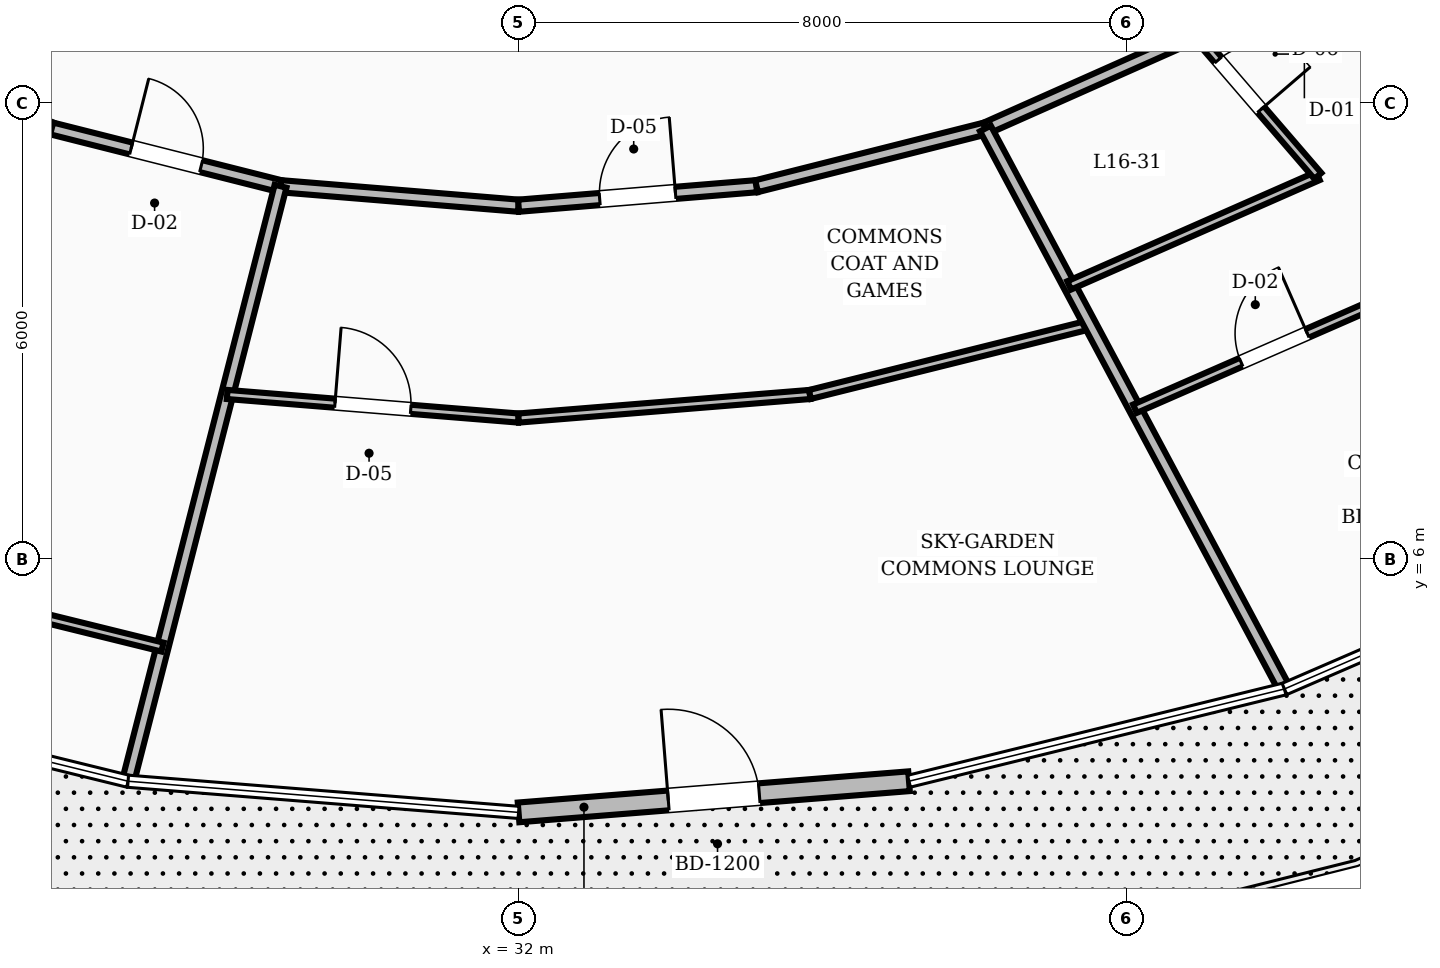
"""IFC4 building model, lengths in metres.
Left out: names, types, materials, properties, quantities, classifications, styles, units other than length and angle.
Written with IfcOpenShell. Run it as: python <this file> out.ifc"""

import sys

from ifc_helpers import new_model, si_unit, direction, frame, frame_2d, origin, place, context, subcontext, project, spatial, rectangle, extrude, element, fill, save


model = new_model("IFC4")
c1 = context("Model", 3, precision=1e-05, world=origin(), true_north=direction((0.0, 1.0)))
c2 = subcontext(c1, "Body", "Model", "MODEL_VIEW")
j1 = project(units=[si_unit("LENGTHUNIT", "METRE"), si_unit("PLANEANGLEUNIT", "RADIAN")], contexts=[c1])
p1 = place(None, origin())
s1 = spatial("IfcSite", under=j1, at=p1, CompositionType="ELEMENT")
p2 = place(p1, origin())
s2 = spatial("IfcBuilding", under=s1, at=p2, CompositionType="ELEMENT")
p3 = place(p2, frame((0.0, 0.0, 66.4)))
s3 = spatial("IfcBuildingStorey", under=s2, at=p3, CompositionType="ELEMENT", Elevation=66.4)
p4 = place(p3, frame((32.0, 2.668, 0.0), z_axis=(0.0, 0.0, 1.0), x_axis=(0.996831376445, 0.079543742268, 0.0)))
e1 = element("IfcWall", 1, at=p4, inside=s3, PredefinedType="STANDARD", context=c2, shape_type="SweptSolid", body=[
    extrude(rectangle(XDim=5.153, YDim=0.26, at=frame_2d((2.577, 0.0))), origin(), (0.0, 0.0, 1.0), 2.71),
])
p5 = place(p4, frame((1.977, 0.0, 0.0)))
e2 = element("IfcOpeningElement", 2, at=p5, cuts=e1, PredefinedType="OPENING", context=c2, shape_type="SweptSolid", body=[
    extrude(rectangle(XDim=1.2, YDim=2.15, at=frame_2d((0.6, 1.075))), frame((0.0, 0.14, 0.0), z_axis=(0.0, -1.0, 0.0), x_axis=(1.0, 0.0, 0.0)), (0.0, 0.0, 1.0), 0.28),
])
p6 = place(p3, frame((23.083, 12.9, 0.0), z_axis=(0.0, 0.0, 1.0), x_axis=(0.913768445178, -0.406235434936, 0.0)))
e3 = element("IfcWall", 3, at=p6, inside=s3, PredefinedType="SOLIDWALL", context=c2, shape_type="SweptSolid", body=[
    extrude(rectangle(XDim=3.037, YDim=0.16, at=frame_2d((1.519, 0.0))), origin(), (0.0, 0.0, 1.0), 2.71),
])
p7 = place(p3, frame((25.858, 11.666, 0.0), z_axis=(0.0, 0.0, 1.0), x_axis=(0.969608333194, -0.244662380029, 0.0)))
e4 = element("IfcWall", 4, at=p7, inside=s3, PredefinedType="SOLIDWALL", context=c2, shape_type="SweptSolid", body=[
    extrude(rectangle(XDim=3.105, YDim=0.16, at=frame_2d((1.553, 0.0))), origin(), (0.0, 0.0, 1.0), 2.71),
])
p8 = place(p7, frame((1.078, 0.0, 0.0)))
e5 = element("IfcOpeningElement", 5, at=p8, cuts=e4, PredefinedType="OPENING", context=c2, shape_type="SweptSolid", body=[
    extrude(rectangle(XDim=0.95, YDim=2.1, at=frame_2d((0.475, 1.05))), frame((0.0, 0.09, 0.0), z_axis=(0.0, -1.0, 0.0), x_axis=(1.0, 0.0, 0.0)), (0.0, 0.0, 1.0), 0.18),
])
p9 = place(p3, frame((28.869, 10.906, 0.0), z_axis=(0.0, 0.0, 1.0), x_axis=(0.996658973252, -0.081675522876, 0.0)))
e6 = element("IfcWall", 6, at=p9, inside=s3, PredefinedType="SOLIDWALL", context=c2, shape_type="SweptSolid", body=[
    extrude(rectangle(XDim=3.142, YDim=0.16, at=frame_2d((1.571, 0.0))), origin(), (0.0, 0.0, 1.0), 2.71),
])
p10 = place(p3, frame((32.0, 10.65, 0.0), z_axis=(0.0, 0.0, 1.0), x_axis=(0.996658973252, 0.081675522876, 0.0)))
e7 = element("IfcWall", 7, at=p10, inside=s3, PredefinedType="SOLIDWALL", context=c2, shape_type="SweptSolid", body=[
    extrude(rectangle(XDim=3.142, YDim=0.16, at=frame_2d((1.571, 0.0))), origin(), (0.0, 0.0, 1.0), 2.71),
])
p11 = place(p10, frame((1.071, 0.0, 0.0)))
e8 = element("IfcOpeningElement", 8, at=p11, cuts=e7, PredefinedType="OPENING", context=c2, shape_type="SweptSolid", body=[
    extrude(rectangle(XDim=1.0, YDim=2.1, at=frame_2d((0.5, 1.05))), frame((0.0, 0.09, 0.0), z_axis=(0.0, -1.0, 0.0), x_axis=(1.0, 0.0, 0.0)), (0.0, 0.0, 1.0), 0.18),
])
p12 = place(p3, frame((35.131, 10.906, 0.0), z_axis=(0.0, 0.0, 1.0), x_axis=(0.969608333194, 0.244662380029, 0.0)))
e9 = element("IfcWall", 9, at=p12, inside=s3, PredefinedType="SOLIDWALL", context=c2, shape_type="SweptSolid", body=[
    extrude(rectangle(XDim=3.105, YDim=0.16, at=frame_2d((1.553, 0.0))), origin(), (0.0, 0.0, 1.0), 2.71),
])
p13 = place(p3, frame((38.142, 11.666, 0.0), z_axis=(0.0, 0.0, 1.0), x_axis=(0.913768445178, 0.406235434936, 0.0)))
e10 = element("IfcWall", 10, at=p13, inside=s3, PredefinedType="SOLIDWALL", context=c2, shape_type="SweptSolid", body=[
    extrude(rectangle(XDim=3.037, YDim=0.16, at=frame_2d((1.519, 0.0))), origin(), (0.0, 0.0, 1.0), 2.71),
])
p14 = place(p3, frame((28.869, 10.906, 0.0), z_axis=(0.0, 0.0, 1.0), x_axis=(-0.248210785058, -0.968706047354, 0.0)))
e11 = element("IfcWall", 11, at=p14, inside=s3, PredefinedType="SOLIDWALL", context=c2, shape_type="SweptSolid", body=[
    extrude(rectangle(XDim=8.031, YDim=0.16, at=frame_2d((4.016, 0.0))), origin(), (0.0, 0.0, 1.0), 2.71),
])
p15 = place(p3, frame((28.167, 8.167, 0.0), z_axis=(0.0, 0.0, 1.0), x_axis=(0.99673954334, -0.080686323138, 0.0)))
e12 = element("IfcWall", 12, at=p15, inside=s3, PredefinedType="PARTITIONING", context=c2, shape_type="SweptSolid", body=[
    extrude(rectangle(XDim=3.846, YDim=0.12, at=frame_2d((1.923, 0.0))), origin(), (0.0, 0.0, 1.0), 2.71),
])
p16 = place(p15, frame((1.423, 0.0, 0.0)))
e13 = element("IfcOpeningElement", 13, at=p16, cuts=e12, PredefinedType="OPENING", context=c2, shape_type="SweptSolid", body=[
    extrude(rectangle(XDim=1.0, YDim=2.1, at=frame_2d((0.5, 1.05))), frame((0.0, 0.07, 0.0), z_axis=(0.0, -1.0, 0.0), x_axis=(1.0, 0.0, 0.0)), (0.0, 0.0, 1.0), 0.14),
])
p17 = place(p3, frame((32.0, 7.856, 0.0), z_axis=(0.0, 0.0, 1.0), x_axis=(0.99673954334, 0.080686323138, 0.0)))
e14 = element("IfcWall", 14, at=p17, inside=s3, PredefinedType="PARTITIONING", context=c2, shape_type="SweptSolid", body=[
    extrude(rectangle(XDim=3.846, YDim=0.12, at=frame_2d((1.923, 0.0))), origin(), (0.0, 0.0, 1.0), 2.71),
])
p18 = place(p3, frame((35.833, 8.167, 0.0), z_axis=(0.0, 0.0, 1.0), x_axis=(0.970331231557, 0.241779447153, 0.0)))
e15 = element("IfcWall", 15, at=p18, inside=s3, PredefinedType="PARTITIONING", context=c2, shape_type="SweptSolid", body=[
    extrude(rectangle(XDim=3.799, YDim=0.12, at=frame_2d((1.899, 0.0))), origin(), (0.0, 0.0, 1.0), 2.71),
])
p19 = place(p3, frame((38.142, 11.666, 0.0), z_axis=(0.0, 0.0, 1.0), x_axis=(0.470742278438, -0.88227076756, 0.0)))
e16 = element("IfcWall", 16, at=p19, inside=s3, PredefinedType="SOLIDWALL", context=c2, shape_type="SweptSolid", body=[
    extrude(rectangle(XDim=8.308, YDim=0.16, at=frame_2d((4.154, 0.0))), origin(), (0.0, 0.0, 1.0), 2.71),
])
p20 = place(p3, frame((39.244, 9.602, 0.0), z_axis=(0.0, 0.0, 1.0), x_axis=(0.915283816573, 0.402809551922, 0.0)))
e17 = element("IfcWall", 17, at=p20, inside=s3, PredefinedType="PARTITIONING", context=c2, shape_type="SweptSolid", body=[
    extrude(rectangle(XDim=3.575, YDim=0.12, at=frame_2d((1.788, 0.0))), origin(), (0.0, 0.0, 1.0), 2.71),
])
p21 = place(p3, frame((40.917, 12.9, 0.0), z_axis=(0.0, 0.0, 1.0), x_axis=(0.652356342029, -0.757912397982, 0.0)))
e18 = element("IfcWall", 18, at=p21, inside=s3, PredefinedType="PARTITIONING", context=c2, shape_type="SweptSolid", body=[
    extrude(rectangle(XDim=2.452, YDim=0.12, at=frame_2d((1.226, 0.0))), origin(), (0.0, 0.0, 1.0), 2.71),
])
p22 = place(p21, frame((0.44, 0.0, 0.0)))
e19 = element("IfcOpeningElement", 19, at=p22, cuts=e18, PredefinedType="OPENING", context=c2, shape_type="SweptSolid", body=[
    extrude(rectangle(XDim=0.86, YDim=2.1, at=frame_2d((0.43, 1.05))), frame((0.0, 0.07, 0.0), z_axis=(0.0, -1.0, 0.0), x_axis=(1.0, 0.0, 0.0)), (0.0, 0.0, 1.0), 0.14),
])
p23 = place(p3, frame((40.109, 7.979, 0.0), z_axis=(0.0, 0.0, 1.0), x_axis=(0.916182555568, 0.400761181844, 0.0)))
e20 = element("IfcWall", 20, at=p23, inside=s3, PredefinedType="PARTITIONING", context=c2, shape_type="SweptSolid", body=[
    extrude(rectangle(XDim=3.999, YDim=0.12, at=frame_2d((2.0, 0.0))), origin(), (0.0, 0.0, 1.0), 2.71),
])
p24 = place(p23, frame((1.524, 0.0, 0.0)))
e21 = element("IfcOpeningElement", 21, at=p24, cuts=e20, PredefinedType="OPENING", context=c2, shape_type="SweptSolid", body=[
    extrude(rectangle(XDim=0.95, YDim=2.1, at=frame_2d((0.475, 1.05))), frame((0.0, 0.07, 0.0), z_axis=(0.0, -1.0, 0.0), x_axis=(1.0, 0.0, 0.0)), (0.0, 0.0, 1.0), 0.14),
])
p25 = place(p3, frame((22.81, 5.955, 0.0), z_axis=(0.0, 0.0, 1.0), x_axis=(0.970880772031, -0.239563199385, 0.0)))
e22 = element("IfcWall", 22, at=p25, inside=s3, PredefinedType="PARTITIONING", context=c2, shape_type="SweptSolid", body=[
    extrude(rectangle(XDim=4.64, YDim=0.12, at=frame_2d((2.32, 0.0))), origin(), (0.0, 0.0, 1.0), 2.71),
])
p26 = place(p5, origin())
e23 = element("IfcDoor", 23, at=p26, inside=s3, OperationType="SINGLE_SWING_LEFT", PredefinedType="DOOR", context=c2, shape_type="SweptSolid", body=[
    extrude(rectangle(XDim=1.2, YDim=2.15, at=frame_2d((0.6, 1.075))), frame((0.0, 0.025, 0.0), z_axis=(0.0, -1.0, 0.0), x_axis=(1.0, 0.0, 0.0)), (0.0, 0.0, 1.0), 0.05),
])
fill(e2, e23)
p27 = place(p11, origin())
e24 = element("IfcDoor", 24, at=p27, inside=s3, OperationType="SINGLE_SWING_RIGHT", PredefinedType="DOOR", context=c2, shape_type="SweptSolid", body=[
    extrude(rectangle(XDim=1.0, YDim=2.1, at=frame_2d((0.5, 1.05))), frame((0.0, 0.025, 0.0), z_axis=(0.0, -1.0, 0.0), x_axis=(1.0, 0.0, 0.0)), (0.0, 0.0, 1.0), 0.05),
])
fill(e8, e24)
p28 = place(p16, origin())
e25 = element("IfcDoor", 25, at=p28, inside=s3, OperationType="SINGLE_SWING_LEFT", PredefinedType="DOOR", context=c2, shape_type="SweptSolid", body=[
    extrude(rectangle(XDim=1.0, YDim=2.1, at=frame_2d((0.5, 1.05))), frame((0.0, 0.025, 0.0), z_axis=(0.0, -1.0, 0.0), x_axis=(1.0, 0.0, 0.0)), (0.0, 0.0, 1.0), 0.05),
])
fill(e13, e25)
p29 = place(p22, origin())
e26 = element("IfcDoor", 26, at=p29, inside=s3, OperationType="SINGLE_SWING_RIGHT", PredefinedType="DOOR", context=c2, shape_type="SweptSolid", body=[
    extrude(rectangle(XDim=0.86, YDim=2.1, at=frame_2d((0.43, 1.05))), frame((0.0, 0.025, 0.0), z_axis=(0.0, -1.0, 0.0), x_axis=(1.0, 0.0, 0.0)), (0.0, 0.0, 1.0), 0.05),
])
fill(e19, e26)
p30 = place(p24, origin())
e27 = element("IfcDoor", 27, at=p30, inside=s3, OperationType="SINGLE_SWING_RIGHT", PredefinedType="DOOR", context=c2, shape_type="SweptSolid", body=[
    extrude(rectangle(XDim=0.95, YDim=2.1, at=frame_2d((0.475, 1.05))), frame((0.0, 0.025, 0.0), z_axis=(0.0, -1.0, 0.0), x_axis=(1.0, 0.0, 0.0)), (0.0, 0.0, 1.0), 0.05),
])
fill(e21, e27)
p31 = place(p8, origin())
e28 = element("IfcDoor", 28, at=p31, inside=s3, OperationType="SINGLE_SWING_LEFT", PredefinedType="DOOR", context=c2, shape_type="SweptSolid", body=[
    extrude(rectangle(XDim=0.95, YDim=2.1, at=frame_2d((0.475, 1.05))), frame((0.0, 0.025, 0.0), z_axis=(0.0, -1.0, 0.0), x_axis=(1.0, 0.0, 0.0)), (0.0, 0.0, 1.0), 0.05),
])
fill(e5, e28)
save(model, sys.argv[1])
